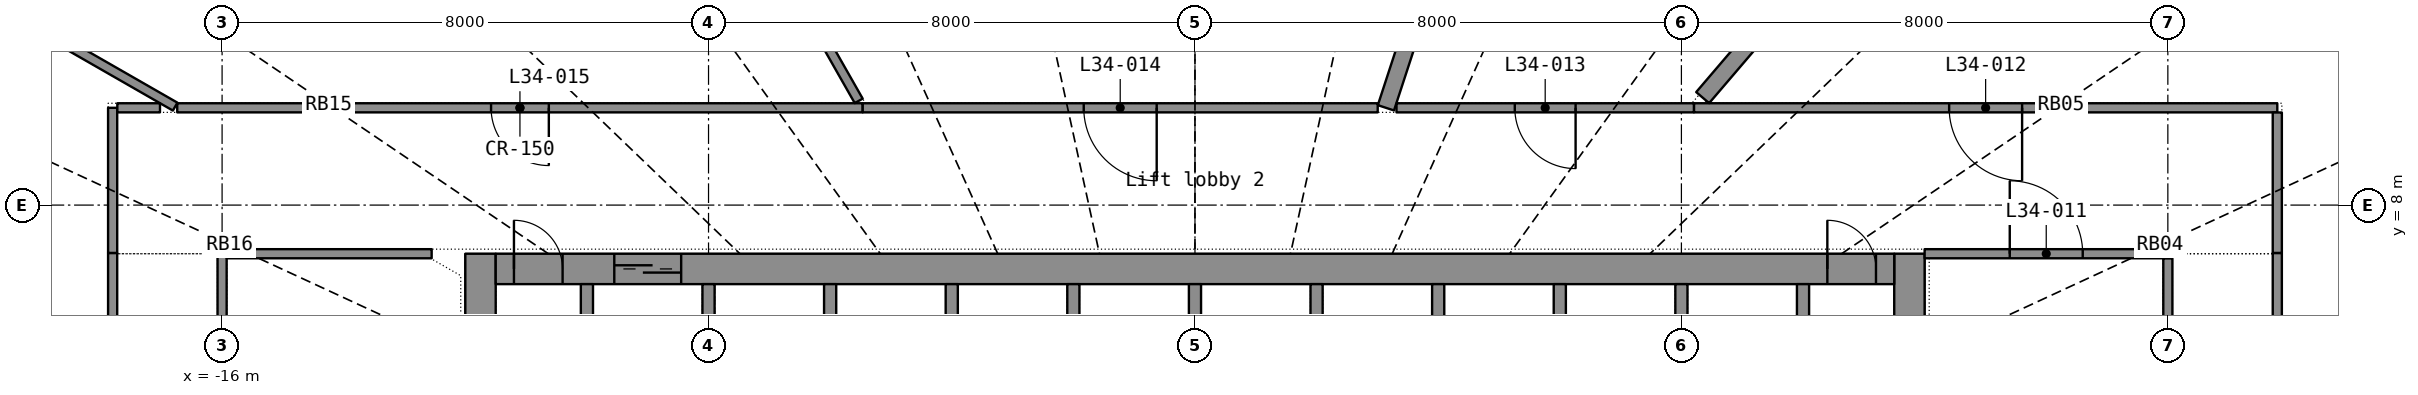
"""IFC4 building model, lengths in metres.
Left out: names, types, materials, properties, quantities, classifications, styles, units other than length and angle.
Written with IfcOpenShell. Run it as: python <this file> out.ifc"""

import sys

from ifc_helpers import new_model, si_unit, direction, frame, frame_2d, origin, place, context, subcontext, project, spatial, rectangle, extrude, element, fill, save


model = new_model("IFC4")
c1 = context("Model", 3, precision=1e-05, world=origin(), true_north=direction((0.0, 1.0)))
c2 = subcontext(c1, "Body", "Model", "MODEL_VIEW")
j1 = project(units=[si_unit("LENGTHUNIT", "METRE"), si_unit("PLANEANGLEUNIT", "RADIAN")], contexts=[c1])
p1 = place(None, origin())
s1 = spatial("IfcSite", under=j1, at=p1, CompositionType="ELEMENT")
p2 = place(p1, origin())
s2 = spatial("IfcBuilding", under=s1, at=p2, CompositionType="ELEMENT")
p3 = place(p2, frame((0.0, 0.0, 141.5)))
s3 = spatial("IfcBuildingStorey", under=s2, at=p3, CompositionType="ELEMENT", Elevation=141.5)
p4 = place(p3, frame((-11.75, -7.2, 0.0), z_axis=(0.0, 0.0, 1.0), x_axis=(0.0, 1.0, 0.0)))
e1 = element("IfcWall", 1, at=p4, inside=s3, PredefinedType="SHEAR", context=c2, shape_type="SweptSolid", body=[
    extrude(rectangle(XDim=14.4, YDim=0.5, at=frame_2d((7.2, 0.0))), origin(), (0.0, 0.0, 1.0), 3.3),
])
p5 = place(p4, frame((6.5, 0.0, 0.0)))
e2 = element("IfcOpeningElement", 2, at=p5, cuts=e1, PredefinedType="OPENING", context=c2, shape_type="SweptSolid", body=[
    extrude(rectangle(XDim=1.4, YDim=2.2, at=frame_2d((0.7, 1.1))), frame((0.0, 0.26, 0.0), z_axis=(0.0, -1.0, 0.0), x_axis=(1.0, 0.0, 0.0)), (0.0, 0.0, 1.0), 0.52),
])
p6 = place(p3, frame((11.75, -7.2, 0.0), z_axis=(0.0, 0.0, 1.0), x_axis=(0.0, 1.0, 0.0)))
e3 = element("IfcWall", 3, at=p6, inside=s3, PredefinedType="SHEAR", context=c2, shape_type="SweptSolid", body=[
    extrude(rectangle(XDim=14.4, YDim=0.5, at=frame_2d((7.2, 0.0))), origin(), (0.0, 0.0, 1.0), 3.3),
])
p7 = place(p6, frame((6.5, 0.0, 0.0)))
e4 = element("IfcOpeningElement", 4, at=p7, cuts=e3, PredefinedType="OPENING", context=c2, shape_type="SweptSolid", body=[
    extrude(rectangle(XDim=1.4, YDim=2.2, at=frame_2d((0.7, 1.1))), frame((0.0, 0.26, 0.0), z_axis=(0.0, -1.0, 0.0), x_axis=(1.0, 0.0, 0.0)), (0.0, 0.0, 1.0), 0.52),
])
p8 = place(p3, frame((-11.5, 6.95, 0.0), z_axis=(0.0, 0.0, 1.0), x_axis=(1.0, 0.0, 0.0)))
e5 = element("IfcWall", 5, at=p8, inside=s3, PredefinedType="SHEAR", context=c2, shape_type="SweptSolid", body=[
    extrude(rectangle(XDim=23.0, YDim=0.5, at=frame_2d((11.5, 0.0))), origin(), (0.0, 0.0, 1.0), 3.3),
])
p9 = place(p8, frame((1.95, 0.0, 0.0)))
e6 = element("IfcOpeningElement", 6, at=p9, cuts=e5, PredefinedType="OPENING", context=c2, shape_type="SweptSolid", body=[
    extrude(rectangle(XDim=1.1, YDim=2.2, at=frame_2d((0.55, 1.1))), frame((0.0, 0.26, 0.0), z_axis=(0.0, -1.0, 0.0), x_axis=(1.0, 0.0, 0.0)), (0.0, 0.0, 1.0), 0.52),
])
p10 = place(p8, frame((0.3, 0.0, 0.0)))
e7 = element("IfcOpeningElement", 7, at=p10, cuts=e5, PredefinedType="OPENING", context=c2, shape_type="SweptSolid", body=[
    extrude(rectangle(XDim=0.8, YDim=2.05, at=frame_2d((0.4, 1.025))), frame((0.0, 0.26, 0.0), z_axis=(0.0, -1.0, 0.0), x_axis=(1.0, 0.0, 0.0)), (0.0, 0.0, 1.0), 0.52),
])
p11 = place(p8, frame((21.9, 0.0, 0.0)))
e8 = element("IfcOpeningElement", 8, at=p11, cuts=e5, PredefinedType="OPENING", context=c2, shape_type="SweptSolid", body=[
    extrude(rectangle(XDim=0.8, YDim=2.05, at=frame_2d((0.4, 1.025))), frame((0.0, 0.26, 0.0), z_axis=(0.0, -1.0, 0.0), x_axis=(1.0, 0.0, 0.0)), (0.0, 0.0, 1.0), 0.52),
])
for number, where, z_axis, x_axis in (
    (9, (-10.0, 3.9, 0.0), (0.0, 0.0, 1.0), (0.0, 1.0, 0.0)),
    (10, (-8.0, 3.9, 0.0), (0.0, 0.0, 1.0), (0.0, 1.0, 0.0)),
    (11, (-6.0, 3.9, 0.0), (0.0, 0.0, 1.0), (0.0, 1.0, 0.0)),
    (12, (-4.0, 3.9, 0.0), (0.0, 0.0, 1.0), (0.0, 1.0, 0.0)),
    (13, (-2.0, 3.9, 0.0), (0.0, 0.0, 1.0), (0.0, 1.0, 0.0)),
    (14, (0.0, 3.9, 0.0), (0.0, 0.0, 1.0), (0.0, 1.0, 0.0)),
    (15, (2.0, 3.9, 0.0), (0.0, 0.0, 1.0), (0.0, 1.0, 0.0)),
    (16, (4.0, 3.9, 0.0), (0.0, 0.0, 1.0), (0.0, 1.0, 0.0)),
    (17, (6.0, 3.9, 0.0), (0.0, 0.0, 1.0), (0.0, 1.0, 0.0)),
    (18, (8.0, 3.9, 0.0), (0.0, 0.0, 1.0), (0.0, 1.0, 0.0)),
    (19, (10.0, 3.9, 0.0), (0.0, 0.0, 1.0), (0.0, 1.0, 0.0)),
):
    element("IfcWall", number, at=place(p3, frame(where, z_axis=z_axis, x_axis=x_axis)), inside=s3, PredefinedType="SHEAR", context=c2, shape_type="SweptSolid", body=[
        extrude(rectangle(XDim=2.8, YDim=0.2, at=frame_2d((1.4, 0.0))), origin(), (0.0, 0.0, 1.0), 3.3),
    ])
p12 = place(p3, frame((-5.465, 9.6, 0.0), z_axis=(0.0, 0.0, 1.0), x_axis=(-1.0, 0.0, 0.0)))
e20 = element("IfcWall", 20, at=p12, inside=s3, PredefinedType="PARTITIONING", context=c2, shape_type="SweptSolid", body=[
    extrude(rectangle(XDim=11.273, YDim=0.15, at=frame_2d((5.636, 0.0))), origin(), (0.0, 0.0, 1.0), 2.4),
])
p13 = place(p12, frame((5.161, 0.0, 0.0)))
e21 = element("IfcOpeningElement", 21, at=p13, cuts=e20, PredefinedType="OPENING", context=c2, shape_type="SweptSolid", body=[
    extrude(rectangle(XDim=0.95, YDim=2.15, at=frame_2d((0.475, 1.075))), frame((0.0, 0.085, 0.0), z_axis=(0.0, -1.0, 0.0), x_axis=(1.0, 0.0, 0.0)), (0.0, 0.0, 1.0), 0.17),
])
p14 = place(p3, frame((6.291, 19.232, 0.0), z_axis=(0.0, 0.0, 1.0), x_axis=(-0.310917992, -0.950436743, 0.0)))
e22 = element("IfcWall", 22, at=p14, inside=s3, PredefinedType="PARTITIONING", context=c2, shape_type="SweptSolid", body=[
    extrude(rectangle(XDim=10.134, YDim=0.28, at=frame_2d((5.067, 0.0))), origin(), (0.0, 0.0, 1.0), 2.4),
])
p15 = place(p14, frame((4.317, 0.0, 1.0)))
e23 = element("IfcOpeningElement", 23, at=p15, cuts=e22, PredefinedType="OPENING", context=c2, shape_type="SweptSolid", body=[
    extrude(rectangle(XDim=1.5, YDim=1.2, at=frame_2d((0.75, 0.6))), frame((0.0, 0.15, 0.0), z_axis=(0.0, -1.0, 0.0), x_axis=(1.0, 0.0, 0.0)), (0.0, 0.0, 1.0), 0.3),
])
p16 = place(p3, frame((-10.274, 18.048, 0.0), z_axis=(0.0, 0.0, 1.0), x_axis=(0.494740094, -0.869040989, 0.0)))
e24 = element("IfcWall", 24, at=p16, inside=s3, PredefinedType="PARTITIONING", context=c2, shape_type="SweptSolid", body=[
    extrude(rectangle(XDim=9.59, YDim=0.15, at=frame_2d((4.795, 0.0))), origin(), (0.0, 0.0, 1.0), 2.4),
])
p17 = place(p3, frame((17.8, 9.6, 0.0), z_axis=(0.0, 0.0, 1.0), x_axis=(-1.0, 0.0, 0.0)))
e25 = element("IfcWall", 25, at=p17, inside=s3, PredefinedType="PARTITIONING", context=c2, shape_type="SweptSolid", body=[
    extrude(rectangle(XDim=9.594, YDim=0.15, at=frame_2d((4.797, 0.0))), origin(), (0.0, 0.0, 1.0), 2.4),
])
p18 = place(p17, frame((4.197, 0.0, 0.0)))
e26 = element("IfcOpeningElement", 26, at=p18, cuts=e25, PredefinedType="OPENING", context=c2, shape_type="SweptSolid", body=[
    extrude(rectangle(XDim=1.2, YDim=2.2, at=frame_2d((0.6, 1.1))), frame((0.0, 0.085, 0.0), z_axis=(0.0, -1.0, 0.0), x_axis=(1.0, 0.0, 0.0)), (0.0, 0.0, 1.0), 0.17),
])
p19 = place(p3, frame((3.005, 9.6, 0.0), z_axis=(0.0, 0.0, 1.0), x_axis=(-1.0, 0.0, 0.0)))
e27 = element("IfcWall", 27, at=p19, inside=s3, PredefinedType="PARTITIONING", context=c2, shape_type="SweptSolid", body=[
    extrude(rectangle(XDim=8.469, YDim=0.15, at=frame_2d((4.235, 0.0))), origin(), (0.0, 0.0, 1.0), 2.4),
])
p20 = place(p19, frame((3.635, 0.0, 0.0)))
e28 = element("IfcOpeningElement", 28, at=p20, cuts=e27, PredefinedType="OPENING", context=c2, shape_type="SweptSolid", body=[
    extrude(rectangle(XDim=1.2, YDim=2.2, at=frame_2d((0.6, 1.1))), frame((0.0, 0.085, 0.0), z_axis=(0.0, -1.0, 0.0), x_axis=(1.0, 0.0, 0.0)), (0.0, 0.0, 1.0), 0.17),
])
p21 = place(p3, frame((12.738, 14.902, 0.0), z_axis=(0.0, 0.0, 1.0), x_axis=(-0.649772728, -0.760128543, 0.0)))
e29 = element("IfcWall", 29, at=p21, inside=s3, PredefinedType="PARTITIONING", context=c2, shape_type="SweptSolid", body=[
    extrude(rectangle(XDim=6.754, YDim=0.28, at=frame_2d((3.377, 0.0))), origin(), (0.0, 0.0, 1.0), 2.4),
])
p22 = place(p3, frame((-16.0, 1.146, 0.0), z_axis=(0.0, 0.0, 1.0), x_axis=(0.0, 1.0, 0.0)))
e30 = element("IfcWall", 30, at=p22, inside=s3, PredefinedType="PARTITIONING", context=c2, shape_type="SweptSolid", body=[
    extrude(rectangle(XDim=6.053, YDim=0.15, at=frame_2d((3.027, 0.0))), origin(), (0.0, 0.0, 1.0), 2.4),
])
p23 = place(p22, frame((2.552, 0.0, 0.0)))
e31 = element("IfcOpeningElement", 31, at=p23, cuts=e30, PredefinedType="OPENING", context=c2, shape_type="SweptSolid", body=[
    extrude(rectangle(XDim=0.95, YDim=2.15, at=frame_2d((0.475, 1.075))), frame((0.0, 0.085, 0.0), z_axis=(0.0, -1.0, 0.0), x_axis=(1.0, 0.0, 0.0)), (0.0, 0.0, 1.0), 0.17),
])
p24 = place(p3, frame((-17.8, 7.212, 0.0), z_axis=(0.0, 0.0, 1.0), x_axis=(0.0, -1.0, 0.0)))
e32 = element("IfcWall", 32, at=p24, inside=s3, PredefinedType="PARTITIONING", context=c2, shape_type="SweptSolid", body=[
    extrude(rectangle(XDim=5.789, YDim=0.15, at=frame_2d((2.894, 0.0))), origin(), (0.0, 0.0, 1.0), 2.4),
])
p25 = place(p24, frame((2.419, 0.0, 0.0)))
e33 = element("IfcOpeningElement", 33, at=p25, cuts=e32, PredefinedType="OPENING", context=c2, shape_type="SweptSolid", body=[
    extrude(rectangle(XDim=0.95, YDim=2.15, at=frame_2d((0.475, 1.075))), frame((0.0, 0.085, 0.0), z_axis=(0.0, -1.0, 0.0), x_axis=(1.0, 0.0, 0.0)), (0.0, 0.0, 1.0), 0.17),
])
p26 = place(p3, frame((8.205, 9.6, 0.0), z_axis=(0.0, 0.0, 1.0), x_axis=(-1.0, 0.0, 0.0)))
e34 = element("IfcWall", 34, at=p26, inside=s3, PredefinedType="PARTITIONING", context=c2, shape_type="SweptSolid", body=[
    extrude(rectangle(XDim=4.891, YDim=0.15, at=frame_2d((2.446, 0.0))), origin(), (0.0, 0.0, 1.0), 2.4),
])
p27 = place(p26, frame((1.946, 0.0, 0.0)))
e35 = element("IfcOpeningElement", 35, at=p27, cuts=e34, PredefinedType="OPENING", context=c2, shape_type="SweptSolid", body=[
    extrude(rectangle(XDim=1.0, YDim=2.2, at=frame_2d((0.5, 1.1))), frame((0.0, 0.085, 0.0), z_axis=(0.0, -1.0, 0.0), x_axis=(1.0, 0.0, 0.0)), (0.0, 0.0, 1.0), 0.17),
])
p28 = place(p3, frame((12.0, 7.2, 0.0), z_axis=(0.0, 0.0, 1.0), x_axis=(1.0, 0.0, 0.0)))
e36 = element("IfcWall", 36, at=p28, inside=s3, PredefinedType="PARTITIONING", context=c2, shape_type="SweptSolid", body=[
    extrude(rectangle(XDim=4.0, YDim=0.15, at=frame_2d((2.0, 0.0))), origin(), (0.0, 0.0, 1.0), 2.4),
])
p29 = place(p28, frame((1.4, 0.0, 0.0)))
e37 = element("IfcOpeningElement", 37, at=p29, cuts=e36, PredefinedType="OPENING", context=c2, shape_type="SweptSolid", body=[
    extrude(rectangle(XDim=1.2, YDim=2.2, at=frame_2d((0.6, 1.1))), frame((0.0, 0.085, 0.0), z_axis=(0.0, -1.0, 0.0), x_axis=(1.0, 0.0, 0.0)), (0.0, 0.0, 1.0), 0.17),
])
p30 = place(p3, frame((16.0, 7.123, 0.0), z_axis=(0.0, 0.0, 1.0), x_axis=(0.0, -1.0, 0.0)))
e38 = element("IfcWall", 38, at=p30, inside=s3, PredefinedType="PARTITIONING", context=c2, shape_type="SweptSolid", body=[
    extrude(rectangle(XDim=3.536, YDim=0.15, at=frame_2d((1.768, 0.0))), origin(), (0.0, 0.0, 1.0), 2.4),
])
p31 = place(p3, frame((-19.926, 11.428, 0.0), z_axis=(0.0, 0.0, 1.0), x_axis=(0.867465124, -0.497497998, 0.0)))
e39 = element("IfcWall", 39, at=p31, inside=s3, PredefinedType="PARTITIONING", context=c2, shape_type="SweptSolid", body=[
    extrude(rectangle(XDim=3.635, YDim=0.15, at=frame_2d((1.818, 0.0))), origin(), (0.0, 0.0, 1.0), 2.4),
])
p32 = place(p3, frame((-15.923, 7.2, 0.0), z_axis=(0.0, 0.0, 1.0), x_axis=(1.0, 0.0, 0.0)))
e40 = element("IfcWall", 40, at=p32, inside=s3, PredefinedType="PARTITIONING", context=c2, shape_type="SweptSolid", body=[
    extrude(rectangle(XDim=3.37, YDim=0.15, at=frame_2d((1.685, 0.0))), origin(), (0.0, 0.0, 1.0), 2.4),
])
p33 = place(p3, frame((17.8, 4.002, 0.0), z_axis=(0.0, 0.0, 1.0), x_axis=(0.0, 1.0, 0.0)))
e41 = element("IfcWall", 41, at=p33, inside=s3, PredefinedType="PARTITIONING", context=c2, shape_type="SweptSolid", body=[
    extrude(rectangle(XDim=3.21, YDim=0.15, at=frame_2d((1.605, 0.0))), origin(), (0.0, 0.0, 1.0), 2.4),
])
p34 = place(p3, frame((-17.8, 9.6, 0.0), z_axis=(0.0, 0.0, 1.0), x_axis=(0.0, -1.0, 0.0)))
e42 = element("IfcWall", 42, at=p34, inside=s3, PredefinedType="PARTITIONING", context=c2, shape_type="SweptSolid", body=[
    extrude(rectangle(XDim=2.387, YDim=0.15, at=frame_2d((1.194, 0.0))), origin(), (0.0, 0.0, 1.0), 2.4),
])
p35 = place(p3, frame((17.8, 7.213, 0.0), z_axis=(0.0, 0.0, 1.0), x_axis=(0.0, 1.0, 0.0)))
e43 = element("IfcWall", 43, at=p35, inside=s3, PredefinedType="PARTITIONING", context=c2, shape_type="SweptSolid", body=[
    extrude(rectangle(XDim=2.31, YDim=0.15, at=frame_2d((1.155, 0.0))), origin(), (0.0, 0.0, 1.0), 2.4),
])
p36 = place(p3, frame((-17.021, 9.6, 0.0), z_axis=(0.0, 0.0, 1.0), x_axis=(-1.0, 0.0, 0.0)))
e44 = element("IfcWall", 44, at=p36, inside=s3, PredefinedType="PARTITIONING", context=c2, shape_type="SweptSolid", body=[
    extrude(rectangle(XDim=0.701, YDim=0.15, at=frame_2d((0.351, 0.0))), origin(), (0.0, 0.0, 1.0), 2.4),
])
p37 = place(p9, origin())
e45 = element("IfcDoor", 45, at=p37, inside=s3, OperationType="DOUBLE_DOOR_SLIDING", PredefinedType="DOOR", context=c2, shape_type="SweptSolid", body=[
    extrude(rectangle(XDim=1.1, YDim=2.2, at=frame_2d((0.55, 1.1))), frame((0.0, 0.025, 0.0), z_axis=(0.0, -1.0, 0.0), x_axis=(1.0, 0.0, 0.0)), (0.0, 0.0, 1.0), 0.05),
])
fill(e6, e45)
p38 = place(p10, origin())
e46 = element("IfcDoor", 46, at=p38, inside=s3, OperationType="SINGLE_SWING_LEFT", PredefinedType="DOOR", context=c2, shape_type="SweptSolid", body=[
    extrude(rectangle(XDim=0.8, YDim=2.05, at=frame_2d((0.4, 1.025))), frame((0.0, 0.025, 0.0), z_axis=(0.0, -1.0, 0.0), x_axis=(1.0, 0.0, 0.0)), (0.0, 0.0, 1.0), 0.05),
])
fill(e7, e46)
p39 = place(p11, origin())
e47 = element("IfcDoor", 47, at=p39, inside=s3, OperationType="SINGLE_SWING_LEFT", PredefinedType="DOOR", context=c2, shape_type="SweptSolid", body=[
    extrude(rectangle(XDim=0.8, YDim=2.05, at=frame_2d((0.4, 1.025))), frame((0.0, 0.025, 0.0), z_axis=(0.0, -1.0, 0.0), x_axis=(1.0, 0.0, 0.0)), (0.0, 0.0, 1.0), 0.05),
])
fill(e8, e47)
p40 = place(p29, origin())
e48 = element("IfcDoor", 48, at=p40, inside=s3, OperationType="DOUBLE_DOOR_SINGLE_SWING", PredefinedType="DOOR", context=c2, shape_type="SweptSolid", body=[
    extrude(rectangle(XDim=1.2, YDim=2.2, at=frame_2d((0.6, 1.1))), frame((0.0, 0.025, 0.0), z_axis=(0.0, -1.0, 0.0), x_axis=(1.0, 0.0, 0.0)), (0.0, 0.0, 1.0), 0.05),
])
fill(e37, e48)
p41 = place(p18, origin())
e49 = element("IfcDoor", 49, at=p41, inside=s3, OperationType="DOUBLE_DOOR_SINGLE_SWING", PredefinedType="DOOR", context=c2, shape_type="SweptSolid", body=[
    extrude(rectangle(XDim=1.2, YDim=2.2, at=frame_2d((0.6, 1.1))), frame((0.0, 0.025, 0.0), z_axis=(0.0, -1.0, 0.0), x_axis=(1.0, 0.0, 0.0)), (0.0, 0.0, 1.0), 0.05),
])
fill(e26, e49)
p42 = place(p27, origin())
e50 = element("IfcDoor", 50, at=p42, inside=s3, OperationType="SINGLE_SWING_LEFT", PredefinedType="DOOR", context=c2, shape_type="SweptSolid", body=[
    extrude(rectangle(XDim=1.0, YDim=2.2, at=frame_2d((0.5, 1.1))), frame((0.0, 0.025, 0.0), z_axis=(0.0, -1.0, 0.0), x_axis=(1.0, 0.0, 0.0)), (0.0, 0.0, 1.0), 0.05),
])
fill(e35, e50)
p43 = place(p20, origin())
e51 = element("IfcDoor", 51, at=p43, inside=s3, OperationType="DOUBLE_DOOR_SINGLE_SWING", PredefinedType="DOOR", context=c2, shape_type="SweptSolid", body=[
    extrude(rectangle(XDim=1.2, YDim=2.2, at=frame_2d((0.6, 1.1))), frame((0.0, 0.025, 0.0), z_axis=(0.0, -1.0, 0.0), x_axis=(1.0, 0.0, 0.0)), (0.0, 0.0, 1.0), 0.05),
])
fill(e28, e51)
p44 = place(p13, origin())
e52 = element("IfcDoor", 52, at=p44, inside=s3, OperationType="SINGLE_SWING_LEFT", PredefinedType="DOOR", context=c2, shape_type="SweptSolid", body=[
    extrude(rectangle(XDim=0.95, YDim=2.15, at=frame_2d((0.475, 1.075))), frame((0.0, 0.025, 0.0), z_axis=(0.0, -1.0, 0.0), x_axis=(1.0, 0.0, 0.0)), (0.0, 0.0, 1.0), 0.05),
])
fill(e21, e52)
save(model, sys.argv[1])
